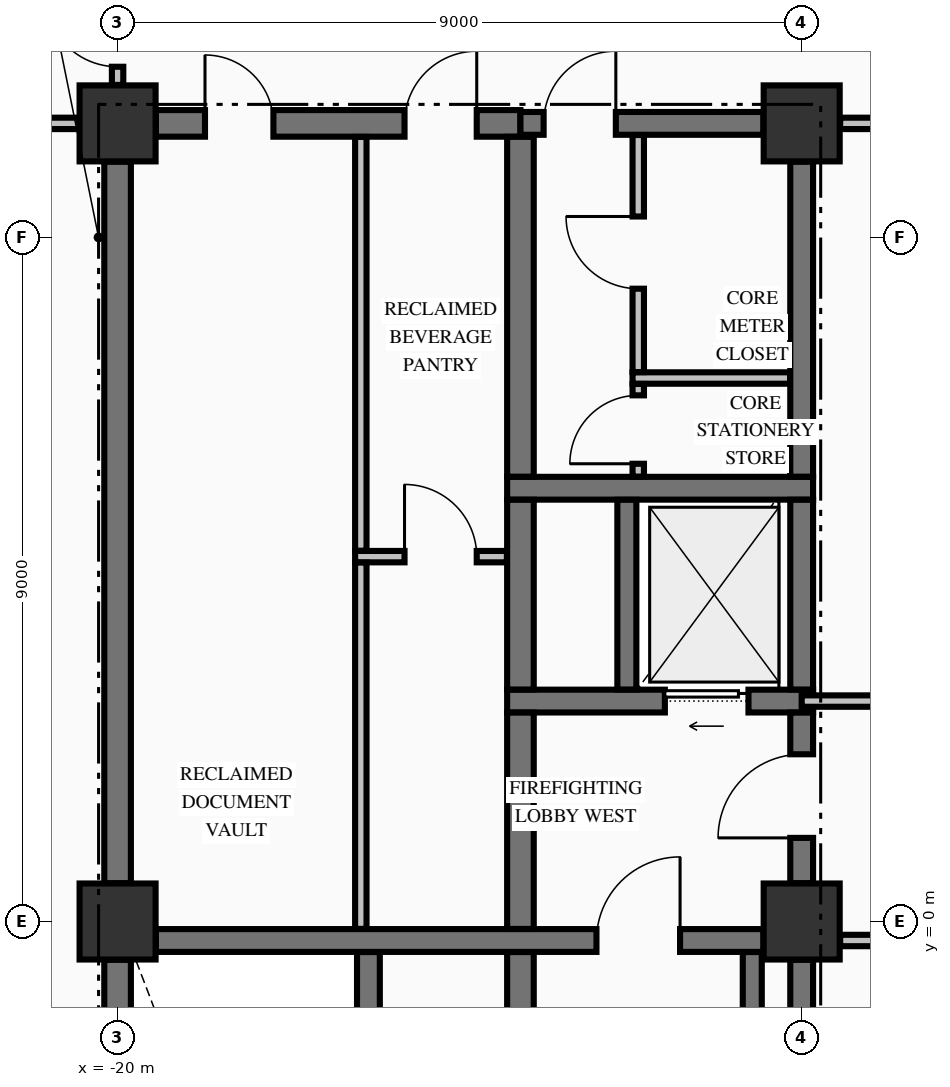
"""IFC4 building model, lengths in metres.
Left out: names, types, materials, properties, quantities, classifications, styles, units other than length and angle.
Written with IfcOpenShell. Run it as: python <this file> out.ifc"""

import sys

from ifc_helpers import new_model, si_unit, direction, frame, frame_2d, origin, origin_2d, place, context, subcontext, project, spatial, rectangle, extrude, element, fill, save


model = new_model("IFC4")
c1 = context("Model", 3, precision=1e-05, world=origin(), true_north=direction((0.0, 1.0)))
c2 = subcontext(c1, "Body", "Model", "MODEL_VIEW")
j1 = project(units=[si_unit("LENGTHUNIT", "METRE"), si_unit("PLANEANGLEUNIT", "RADIAN")], contexts=[c1])
p1 = place(None, origin())
s1 = spatial("IfcSite", under=j1, at=p1, CompositionType="ELEMENT")
p2 = place(p1, origin())
s2 = spatial("IfcBuilding", under=s1, at=p2, CompositionType="ELEMENT")
p3 = place(p2, frame((0.0, 0.0, 102.07)))
s3 = spatial("IfcBuildingStorey", under=s2, at=p3, CompositionType="ELEMENT", Elevation=102.07)
for number, where, z_axis, x_axis in (
    (1, (-20.0, 10.5, -0.25), (0.0, 0.0, 1.0), (1.0, 0.0, 0.0)),
    (2, (-11.0, 0.0, -0.25), (0.0, 0.0, 1.0), (1.0, 0.0, 0.0)),
    (3, (-11.0, 10.5, -0.25), (0.0, 0.0, 1.0), (1.0, 0.0, 0.0)),
    (4, (-20.0, 0.0, -0.25), (0.0, 0.0, 1.0), (1.0, 0.0, 0.0)),
):
    element("IfcColumn", number, at=place(p3, frame(where, z_axis=z_axis, x_axis=x_axis)), inside=s3, PredefinedType="COLUMN", context=c2, shape_type="SweptSolid", body=[
        extrude(rectangle(XDim=1.0, YDim=1.0, at=origin_2d()), origin(), (0.0, 0.0, 1.0), 3.57),
    ])
p4 = place(p3, frame((-19.496, -0.25, 0.0), z_axis=(0.0, 0.0, 1.0), x_axis=(1.0, 0.0, 0.0)))
e5 = element("IfcWall", 5, at=p4, inside=s3, PredefinedType="SHEAR", context=c2, shape_type="SweptSolid", body=[
    extrude(rectangle(XDim=7.992, YDim=0.3, at=frame_2d((3.996, 0.0))), origin(), (0.0, 0.0, 1.0), 3.32),
])
p5 = place(p4, frame((5.796, 0.0, 0.0)))
e6 = element("IfcOpeningElement", 6, at=p5, cuts=e5, PredefinedType="OPENING", context=c2, shape_type="SweptSolid", body=[
    extrude(rectangle(XDim=1.1, YDim=2.15, at=frame_2d((0.55, 1.075))), frame((0.0, 0.16, 0.0), z_axis=(0.0, -1.0, 0.0), x_axis=(1.0, 0.0, 0.0)), (0.0, 0.0, 1.0), 0.32),
])
p6 = place(p3, frame((-14.875, 2.9, 0.0), z_axis=(0.0, 0.0, 1.0), x_axis=(1.0, 0.0, 0.0)))
e7 = element("IfcWall", 7, at=p6, inside=s3, PredefinedType="SHEAR", context=c2, shape_type="SweptSolid", body=[
    extrude(rectangle(XDim=4.025, YDim=0.3, at=frame_2d((2.012, 0.0))), origin(), (0.0, 0.0, 1.0), 3.32),
])
p7 = place(p6, frame((2.075, 0.0, 0.0)))
e8 = element("IfcOpeningElement", 8, at=p7, cuts=e7, PredefinedType="OPENING", context=c2, shape_type="SweptSolid", body=[
    extrude(rectangle(XDim=1.1, YDim=2.2, at=frame_2d((0.55, 1.1))), frame((0.0, 0.16, 0.0), z_axis=(0.0, -1.0, 0.0), x_axis=(1.0, 0.0, 0.0)), (0.0, 0.0, 1.0), 0.32),
])
p8 = place(p3, frame((-14.875, 5.7, 0.0), z_axis=(0.0, 0.0, 1.0), x_axis=(1.0, 0.0, 0.0)))
e9 = element("IfcWall", 9, at=p8, inside=s3, PredefinedType="SHEAR", context=c2, shape_type="SweptSolid", body=[
    extrude(rectangle(XDim=4.025, YDim=0.3, at=frame_2d((2.012, 0.0))), origin(), (0.0, 0.0, 1.0), 3.32),
])
p9 = place(p3, frame((-19.496, 10.5, 0.0), z_axis=(0.0, 0.0, 1.0), x_axis=(1.0, 0.0, 0.0)))
e10 = element("IfcWall", 10, at=p9, inside=s3, PredefinedType="SHEAR", context=c2, shape_type="SweptSolid", body=[
    extrude(rectangle(XDim=4.796, YDim=0.35, at=frame_2d((2.398, 0.0))), origin(), (0.0, 0.0, 1.0), 3.32),
])
p10 = place(p9, frame((0.646, 0.0, 0.0)))
e11 = element("IfcOpeningElement", 11, at=p10, cuts=e10, PredefinedType="OPENING", context=c2, shape_type="SweptSolid", body=[
    extrude(rectangle(XDim=0.9, YDim=2.15, at=frame_2d((0.45, 1.075))), frame((0.0, 0.185, 0.0), z_axis=(0.0, -1.0, 0.0), x_axis=(1.0, 0.0, 0.0)), (0.0, 0.0, 1.0), 0.37),
])
p11 = place(p9, frame((3.271, 0.0, 0.0)))
e12 = element("IfcOpeningElement", 12, at=p11, cuts=e10, PredefinedType="OPENING", context=c2, shape_type="SweptSolid", body=[
    extrude(rectangle(XDim=0.95, YDim=2.15, at=frame_2d((0.475, 1.075))), frame((0.0, 0.185, 0.0), z_axis=(0.0, -1.0, 0.0), x_axis=(1.0, 0.0, 0.0)), (0.0, 0.0, 1.0), 0.37),
])
p12 = place(p3, frame((-14.7, 10.5, 0.0), z_axis=(0.0, 0.0, 1.0), x_axis=(1.0, 0.0, 0.0)))
e13 = element("IfcWall", 13, at=p12, inside=s3, PredefinedType="SHEAR", context=c2, shape_type="SweptSolid", body=[
    extrude(rectangle(XDim=3.196, YDim=0.3, at=frame_2d((1.598, 0.0))), origin(), (0.0, 0.0, 1.0), 3.32),
])
p13 = place(p12, frame((0.305, 0.0, 0.0)))
e14 = element("IfcOpeningElement", 14, at=p13, cuts=e13, PredefinedType="OPENING", context=c2, shape_type="SweptSolid", body=[
    extrude(rectangle(XDim=0.95, YDim=2.15, at=frame_2d((0.475, 1.075))), frame((0.0, 0.16, 0.0), z_axis=(0.0, -1.0, 0.0), x_axis=(1.0, 0.0, 0.0)), (0.0, 0.0, 1.0), 0.32),
])
p14 = place(p3, frame((-10.494, -0.25, 0.0), z_axis=(0.0, 0.0, 1.0), x_axis=(1.0, 0.0, 0.0)))
e15 = element("IfcWall", 15, at=p14, inside=s3, PredefinedType="PARTITIONING", context=c2, shape_type="SweptSolid", body=[
    extrude(rectangle(XDim=20.988, YDim=0.15, at=frame_2d((10.494, 0.0))), origin(), (0.0, 0.0, 1.0), 3.32),
])
p15 = place(p14, frame((12.594, 0.0, 0.0)))
e16 = element("IfcOpeningElement", 16, at=p15, cuts=e15, PredefinedType="OPENING", context=c2, shape_type="SweptSolid", body=[
    extrude(rectangle(XDim=1.1, YDim=2.15, at=frame_2d((0.55, 1.075))), frame((0.0, 0.085, 0.0), z_axis=(0.0, -1.0, 0.0), x_axis=(1.0, 0.0, 0.0)), (0.0, 0.0, 1.0), 0.17),
])
p16 = place(p14, frame((5.249, 0.0, 0.0)))
e17 = element("IfcOpeningElement", 17, at=p16, cuts=e15, PredefinedType="OPENING", context=c2, shape_type="SweptSolid", body=[
    extrude(rectangle(XDim=1.05, YDim=2.15, at=frame_2d((0.525, 1.075))), frame((0.0, 0.085, 0.0), z_axis=(0.0, -1.0, 0.0), x_axis=(1.0, 0.0, 0.0)), (0.0, 0.0, 1.0), 0.17),
])
p17 = place(p14, frame((17.399, 0.0, 0.0)))
e18 = element("IfcOpeningElement", 18, at=p17, cuts=e15, PredefinedType="OPENING", context=c2, shape_type="SweptSolid", body=[
    extrude(rectangle(XDim=0.95, YDim=2.15, at=frame_2d((0.475, 1.075))), frame((0.0, 0.085, 0.0), z_axis=(0.0, -1.0, 0.0), x_axis=(1.0, 0.0, 0.0)), (0.0, 0.0, 1.0), 0.17),
])
p18 = place(p3, frame((-11.0, 2.9, 0.0), z_axis=(0.0, 0.0, 1.0), x_axis=(1.0, 0.0, 0.0)))
e19 = element("IfcWall", 19, at=p18, inside=s3, PredefinedType="PARTITIONING", context=c2, shape_type="SweptSolid", body=[
    extrude(rectangle(XDim=22.0, YDim=0.15, at=frame_2d((11.0, 0.0))), origin(), (0.0, 0.0, 1.0), 3.32),
])
p19 = place(p18, frame((13.1, 0.0, 0.0)))
e20 = element("IfcOpeningElement", 20, at=p19, cuts=e19, PredefinedType="OPENING", context=c2, shape_type="SweptSolid", body=[
    extrude(rectangle(XDim=1.1, YDim=2.15, at=frame_2d((0.55, 1.075))), frame((0.0, 0.085, 0.0), z_axis=(0.0, -1.0, 0.0), x_axis=(1.0, 0.0, 0.0)), (0.0, 0.0, 1.0), 0.17),
])
p20 = place(p18, frame((5.755, 0.0, 0.0)))
e21 = element("IfcOpeningElement", 21, at=p20, cuts=e19, PredefinedType="OPENING", context=c2, shape_type="SweptSolid", body=[
    extrude(rectangle(XDim=1.05, YDim=2.15, at=frame_2d((0.525, 1.075))), frame((0.0, 0.085, 0.0), z_axis=(0.0, -1.0, 0.0), x_axis=(1.0, 0.0, 0.0)), (0.0, 0.0, 1.0), 0.17),
])
p21 = place(p18, frame((15.755, 0.0, 0.0)))
e22 = element("IfcOpeningElement", 22, at=p21, cuts=e19, PredefinedType="OPENING", context=c2, shape_type="SweptSolid", body=[
    extrude(rectangle(XDim=0.95, YDim=2.15, at=frame_2d((0.475, 1.075))), frame((0.0, 0.085, 0.0), z_axis=(0.0, -1.0, 0.0), x_axis=(1.0, 0.0, 0.0)), (0.0, 0.0, 1.0), 0.17),
])
p22 = place(p18, frame((19.385, 0.0, 0.0)))
e23 = element("IfcOpeningElement", 23, at=p22, cuts=e19, PredefinedType="OPENING", context=c2, shape_type="SweptSolid", body=[
    extrude(rectangle(XDim=0.95, YDim=2.15, at=frame_2d((0.475, 1.075))), frame((0.0, 0.085, 0.0), z_axis=(0.0, -1.0, 0.0), x_axis=(1.0, 0.0, 0.0)), (0.0, 0.0, 1.0), 0.17),
])
p23 = place(p3, frame((-16.875, 4.8, 0.0), z_axis=(0.0, 0.0, 1.0), x_axis=(1.0, 0.0, 0.0)))
e24 = element("IfcWall", 24, at=p23, inside=s3, PredefinedType="PARTITIONING", context=c2, shape_type="SweptSolid", body=[
    extrude(rectangle(XDim=1.997, YDim=0.15, at=frame_2d((0.999, 0.0))), origin(), (0.0, 0.0, 1.0), 3.32),
])
p24 = place(p23, frame((0.65, 0.0, 0.0)))
e25 = element("IfcOpeningElement", 25, at=p24, cuts=e24, PredefinedType="OPENING", context=c2, shape_type="SweptSolid", body=[
    extrude(rectangle(XDim=0.95, YDim=2.15, at=frame_2d((0.475, 1.075))), frame((0.0, 0.085, 0.0), z_axis=(0.0, -1.0, 0.0), x_axis=(1.0, 0.0, 0.0)), (0.0, 0.0, 1.0), 0.17),
])
p25 = place(p3, frame((-13.225, 7.15, 0.0), z_axis=(0.0, 0.0, 1.0), x_axis=(1.0, 0.0, 0.0)))
e26 = element("IfcWall", 26, at=p25, inside=s3, PredefinedType="PARTITIONING", context=c2, shape_type="SweptSolid", body=[
    extrude(rectangle(XDim=2.072, YDim=0.15, at=frame_2d((1.036, 0.0))), origin(), (0.0, 0.0, 1.0), 3.32),
])
p26 = place(p3, frame((-22.835, 10.5, 0.0), z_axis=(0.0, 0.0, 1.0), x_axis=(1.0, 0.0, 0.0)))
e27 = element("IfcWall", 27, at=p26, inside=s3, PredefinedType="PARTITIONING", context=c2, shape_type="SweptSolid", body=[
    extrude(rectangle(XDim=2.329, YDim=0.15, at=frame_2d((1.165, 0.0))), origin(), (0.0, 0.0, 1.0), 3.32),
])
p27 = place(p26, frame((0.835, 0.0, 0.0)))
e28 = element("IfcOpeningElement", 28, at=p27, cuts=e27, PredefinedType="OPENING", context=c2, shape_type="SweptSolid", body=[
    extrude(rectangle(XDim=1.0, YDim=2.15, at=frame_2d((0.5, 1.075))), frame((0.0, 0.085, 0.0), z_axis=(0.0, -1.0, 0.0), x_axis=(1.0, 0.0, 0.0)), (0.0, 0.0, 1.0), 0.17),
])
p28 = place(p3, frame((-10.494, 10.5, 0.0), z_axis=(0.0, 0.0, 1.0), x_axis=(1.0, 0.0, 0.0)))
e29 = element("IfcWall", 29, at=p28, inside=s3, PredefinedType="PARTITIONING", context=c2, shape_type="SweptSolid", body=[
    extrude(rectangle(XDim=20.988, YDim=0.15, at=frame_2d((10.494, 0.0))), origin(), (0.0, 0.0, 1.0), 3.32),
])
p29 = place(p28, frame((12.594, 0.0, 0.0)))
e30 = element("IfcOpeningElement", 30, at=p29, cuts=e29, PredefinedType="OPENING", context=c2, shape_type="SweptSolid", body=[
    extrude(rectangle(XDim=1.1, YDim=2.15, at=frame_2d((0.55, 1.075))), frame((0.0, 0.085, 0.0), z_axis=(0.0, -1.0, 0.0), x_axis=(1.0, 0.0, 0.0)), (0.0, 0.0, 1.0), 0.17),
])
p30 = place(p3, frame((-20.0, -9.446, 0.0), z_axis=(0.0, 0.0, 1.0), x_axis=(0.0, 1.0, 0.0)))
e31 = element("IfcWall", 31, at=p30, inside=s3, PredefinedType="SHEAR", context=c2, shape_type="SweptSolid", body=[
    extrude(rectangle(XDim=8.942, YDim=0.35, at=frame_2d((4.471, 0.0))), origin(), (0.0, 0.0, 1.0), 3.32),
])
p31 = place(p3, frame((-20.0, 0.504, 0.0), z_axis=(0.0, 0.0, 1.0), x_axis=(0.0, 1.0, 0.0)))
e32 = element("IfcWall", 32, at=p31, inside=s3, PredefinedType="SHEAR", context=c2, shape_type="SweptSolid", body=[
    extrude(rectangle(XDim=9.492, YDim=0.35, at=frame_2d((4.746, 0.0))), origin(), (0.0, 0.0, 1.0), 3.32),
])
p32 = place(p3, frame((-16.7, -9.773, 0.0), z_axis=(0.0, 0.0, 1.0), x_axis=(0.0, 1.0, 0.0)))
e33 = element("IfcWall", 33, at=p32, inside=s3, PredefinedType="SHEAR", context=c2, shape_type="SweptSolid", body=[
    extrude(rectangle(XDim=9.371, YDim=0.3, at=frame_2d((4.686, 0.0))), origin(), (0.0, 0.0, 1.0), 3.32),
])
p33 = place(p3, frame((-14.7, -9.773, 0.0), z_axis=(0.0, 0.0, 1.0), x_axis=(0.0, 1.0, 0.0)))
e34 = element("IfcWall", 34, at=p33, inside=s3, PredefinedType="SHEAR", context=c2, shape_type="SweptSolid", body=[
    extrude(rectangle(XDim=9.371, YDim=0.35, at=frame_2d((4.686, 0.0))), origin(), (0.0, 0.0, 1.0), 3.32),
])
p34 = place(p3, frame((-14.7, -0.098, 0.0), z_axis=(0.0, 0.0, 1.0), x_axis=(0.0, 1.0, 0.0)))
e35 = element("IfcWall", 35, at=p34, inside=s3, PredefinedType="SHEAR", context=c2, shape_type="SweptSolid", body=[
    extrude(rectangle(XDim=2.846, YDim=0.35, at=frame_2d((1.423, 0.0))), origin(), (0.0, 0.0, 1.0), 3.32),
])
p35 = place(p3, frame((-14.7, 3.052, 0.0), z_axis=(0.0, 0.0, 1.0), x_axis=(0.0, 1.0, 0.0)))
e36 = element("IfcWall", 36, at=p35, inside=s3, PredefinedType="SHEAR", context=c2, shape_type="SweptSolid", body=[
    extrude(rectangle(XDim=2.496, YDim=0.35, at=frame_2d((1.248, 0.0))), origin(), (0.0, 0.0, 1.0), 3.32),
])
p36 = place(p3, frame((-14.7, 5.852, 0.0), z_axis=(0.0, 0.0, 1.0), x_axis=(0.0, 1.0, 0.0)))
e37 = element("IfcWall", 37, at=p36, inside=s3, PredefinedType="SHEAR", context=c2, shape_type="SweptSolid", body=[
    extrude(rectangle(XDim=4.471, YDim=0.35, at=frame_2d((2.235, 0.0))), origin(), (0.0, 0.0, 1.0), 3.32),
])
p37 = place(p3, frame((-13.3, 3.052, 0.0), z_axis=(0.0, 0.0, 1.0), x_axis=(0.0, 1.0, 0.0)))
e38 = element("IfcWall", 38, at=p37, inside=s3, PredefinedType="SOLIDWALL", context=c2, shape_type="SweptSolid", body=[
    extrude(rectangle(XDim=2.496, YDim=0.25, at=frame_2d((1.248, 0.0))), origin(), (0.0, 0.0, 1.0), 3.32),
])
p38 = place(p3, frame((-11.65, -9.798, 0.0), z_axis=(0.0, 0.0, 1.0), x_axis=(0.0, 1.0, 0.0)))
e39 = element("IfcWall", 39, at=p38, inside=s3, PredefinedType="SOLIDWALL", context=c2, shape_type="SweptSolid", body=[
    extrude(rectangle(XDim=9.396, YDim=0.25, at=frame_2d((4.698, 0.0))), origin(), (0.0, 0.0, 1.0), 3.32),
])
p39 = place(p3, frame((-11.0, -9.446, 0.0), z_axis=(0.0, 0.0, 1.0), x_axis=(0.0, 1.0, 0.0)))
e40 = element("IfcWall", 40, at=p39, inside=s3, PredefinedType="SHEAR", context=c2, shape_type="SweptSolid", body=[
    extrude(rectangle(XDim=8.942, YDim=0.3, at=frame_2d((4.471, 0.0))), origin(), (0.0, 0.0, 1.0), 3.32),
])
p40 = place(p3, frame((-11.0, 0.504, 0.0), z_axis=(0.0, 0.0, 1.0), x_axis=(0.0, 1.0, 0.0)))
e41 = element("IfcWall", 41, at=p40, inside=s3, PredefinedType="SHEAR", context=c2, shape_type="SweptSolid", body=[
    extrude(rectangle(XDim=2.244, YDim=0.3, at=frame_2d((1.122, 0.0))), origin(), (0.0, 0.0, 1.0), 3.32),
])
p41 = place(p40, frame((0.596, 0.0, 0.0)))
e42 = element("IfcOpeningElement", 42, at=p41, cuts=e41, PredefinedType="OPENING", context=c2, shape_type="SweptSolid", body=[
    extrude(rectangle(XDim=1.1, YDim=2.15, at=frame_2d((0.55, 1.075))), frame((0.0, 0.16, 0.0), z_axis=(0.0, -1.0, 0.0), x_axis=(1.0, 0.0, 0.0)), (0.0, 0.0, 1.0), 0.32),
])
p42 = place(p3, frame((-11.0, 3.052, 0.0), z_axis=(0.0, 0.0, 1.0), x_axis=(0.0, 1.0, 0.0)))
e43 = element("IfcWall", 43, at=p42, inside=s3, PredefinedType="SHEAR", context=c2, shape_type="SweptSolid", body=[
    extrude(rectangle(XDim=2.496, YDim=0.3, at=frame_2d((1.248, 0.0))), origin(), (0.0, 0.0, 1.0), 3.32),
])
p43 = place(p3, frame((-11.0, 5.852, 0.0), z_axis=(0.0, 0.0, 1.0), x_axis=(0.0, 1.0, 0.0)))
e44 = element("IfcWall", 44, at=p43, inside=s3, PredefinedType="SHEAR", context=c2, shape_type="SweptSolid", body=[
    extrude(rectangle(XDim=4.144, YDim=0.3, at=frame_2d((2.072, 0.0))), origin(), (0.0, 0.0, 1.0), 3.32),
])
p44 = place(p3, frame((-20.0, 11.006, 0.0), z_axis=(0.0, 0.0, 1.0), x_axis=(0.0, 1.0, 0.0)))
e45 = element("IfcWall", 45, at=p44, inside=s3, PredefinedType="PARTITIONING", context=c2, shape_type="SweptSolid", body=[
    extrude(rectangle(XDim=1.866, YDim=0.15, at=frame_2d((0.933, 0.0))), origin(), (0.0, 0.0, 1.0), 2.81),
])
p45 = place(p44, frame((0.239, 0.0, 0.0)))
e46 = element("IfcOpeningElement", 46, at=p45, cuts=e45, PredefinedType="OPENING", context=c2, shape_type="SweptSolid", body=[
    extrude(rectangle(XDim=0.95, YDim=2.15, at=frame_2d((0.475, 1.075))), frame((0.0, 0.085, 0.0), z_axis=(0.0, -1.0, 0.0), x_axis=(1.0, 0.0, 0.0)), (0.0, 0.0, 1.0), 0.17),
])
p46 = place(p3, frame((-16.8, -0.097, 0.0), z_axis=(0.0, 0.0, 1.0), x_axis=(0.0, 1.0, 0.0)))
e47 = element("IfcWall", 47, at=p46, inside=s3, PredefinedType="PARTITIONING", context=c2, shape_type="SweptSolid", body=[
    extrude(rectangle(XDim=4.819, YDim=0.15, at=frame_2d((2.409, 0.0))), origin(), (0.0, 0.0, 1.0), 3.32),
])
p47 = place(p3, frame((-16.8, 4.878, 0.0), z_axis=(0.0, 0.0, 1.0), x_axis=(0.0, 1.0, 0.0)))
e48 = element("IfcWall", 48, at=p47, inside=s3, PredefinedType="PARTITIONING", context=c2, shape_type="SweptSolid", body=[
    extrude(rectangle(XDim=5.444, YDim=0.15, at=frame_2d((2.722, 0.0))), origin(), (0.0, 0.0, 1.0), 3.32),
])
p48 = place(p3, frame((-13.15, 5.853, 0.0), z_axis=(0.0, 0.0, 1.0), x_axis=(0.0, 1.0, 0.0)))
e49 = element("IfcWall", 49, at=p48, inside=s3, PredefinedType="PARTITIONING", context=c2, shape_type="SweptSolid", body=[
    extrude(rectangle(XDim=1.219, YDim=0.15, at=frame_2d((0.609, 0.0))), origin(), (0.0, 0.0, 1.0), 3.32),
])
p49 = place(p48, frame((0.169, 0.0, 0.0)))
e50 = element("IfcOpeningElement", 50, at=p49, cuts=e49, PredefinedType="OPENING", context=c2, shape_type="SweptSolid", body=[
    extrude(rectangle(XDim=0.9, YDim=2.15, at=frame_2d((0.45, 1.075))), frame((0.0, 0.085, 0.0), z_axis=(0.0, -1.0, 0.0), x_axis=(1.0, 0.0, 0.0)), (0.0, 0.0, 1.0), 0.17),
])
p50 = place(p3, frame((-13.15, 7.228, 0.0), z_axis=(0.0, 0.0, 1.0), x_axis=(0.0, 1.0, 0.0)))
e51 = element("IfcWall", 51, at=p50, inside=s3, PredefinedType="PARTITIONING", context=c2, shape_type="SweptSolid", body=[
    extrude(rectangle(XDim=3.119, YDim=0.15, at=frame_2d((1.56, 0.0))), origin(), (0.0, 0.0, 1.0), 3.32),
])
p51 = place(p50, frame((1.097, 0.0, 0.0)))
e52 = element("IfcOpeningElement", 52, at=p51, cuts=e51, PredefinedType="OPENING", context=c2, shape_type="SweptSolid", body=[
    extrude(rectangle(XDim=0.95, YDim=2.15, at=frame_2d((0.475, 1.075))), frame((0.0, 0.085, 0.0), z_axis=(0.0, -1.0, 0.0), x_axis=(1.0, 0.0, 0.0)), (0.0, 0.0, 1.0), 0.17),
])
p52 = place(p5, origin())
e53 = element("IfcDoor", 53, at=p52, inside=s3, OperationType="SINGLE_SWING_RIGHT", PredefinedType="DOOR", context=c2, shape_type="SweptSolid", body=[
    extrude(rectangle(XDim=1.1, YDim=2.15, at=frame_2d((0.55, 1.075))), frame((0.0, 0.025, 0.0), z_axis=(0.0, -1.0, 0.0), x_axis=(1.0, 0.0, 0.0)), (0.0, 0.0, 1.0), 0.05),
])
fill(e6, e53)
p53 = place(p41, origin())
e54 = element("IfcDoor", 54, at=p53, inside=s3, OperationType="SINGLE_SWING_LEFT", PredefinedType="DOOR", context=c2, shape_type="SweptSolid", body=[
    extrude(rectangle(XDim=1.1, YDim=2.15, at=frame_2d((0.55, 1.075))), frame((0.0, 0.025, 0.0), z_axis=(0.0, -1.0, 0.0), x_axis=(1.0, 0.0, 0.0)), (0.0, 0.0, 1.0), 0.05),
])
fill(e42, e54)
p54 = place(p7, origin())
e55 = element("IfcDoor", 55, at=p54, inside=s3, OperationType="SLIDING_TO_LEFT", PredefinedType="DOOR", context=c2, shape_type="SweptSolid", body=[
    extrude(rectangle(XDim=1.1, YDim=2.2, at=frame_2d((0.55, 1.1))), frame((0.0, 0.025, 0.0), z_axis=(0.0, -1.0, 0.0), x_axis=(1.0, 0.0, 0.0)), (0.0, 0.0, 1.0), 0.05),
])
fill(e8, e55)
p55 = place(p13, origin())
e56 = element("IfcDoor", 56, at=p55, inside=s3, OperationType="SINGLE_SWING_RIGHT", PredefinedType="DOOR", context=c2, shape_type="SweptSolid", body=[
    extrude(rectangle(XDim=0.95, YDim=2.15, at=frame_2d((0.475, 1.075))), frame((0.0, 0.025, 0.0), z_axis=(0.0, -1.0, 0.0), x_axis=(1.0, 0.0, 0.0)), (0.0, 0.0, 1.0), 0.05),
])
fill(e14, e56)
p56 = place(p49, origin())
e57 = element("IfcDoor", 57, at=p56, inside=s3, OperationType="SINGLE_SWING_LEFT", PredefinedType="DOOR", context=c2, shape_type="SweptSolid", body=[
    extrude(rectangle(XDim=0.9, YDim=2.15, at=frame_2d((0.45, 1.075))), frame((0.0, 0.025, 0.0), z_axis=(0.0, -1.0, 0.0), x_axis=(1.0, 0.0, 0.0)), (0.0, 0.0, 1.0), 0.05),
])
fill(e50, e57)
p57 = place(p51, origin())
e58 = element("IfcDoor", 58, at=p57, inside=s3, OperationType="SINGLE_SWING_RIGHT", PredefinedType="DOOR", context=c2, shape_type="SweptSolid", body=[
    extrude(rectangle(XDim=0.95, YDim=2.15, at=frame_2d((0.475, 1.075))), frame((0.0, 0.025, 0.0), z_axis=(0.0, -1.0, 0.0), x_axis=(1.0, 0.0, 0.0)), (0.0, 0.0, 1.0), 0.05),
])
fill(e52, e58)
p58 = place(p10, origin())
e59 = element("IfcDoor", 59, at=p58, inside=s3, OperationType="SINGLE_SWING_LEFT", PredefinedType="DOOR", context=c2, shape_type="SweptSolid", body=[
    extrude(rectangle(XDim=0.9, YDim=2.15, at=frame_2d((0.45, 1.075))), frame((0.0, 0.025, 0.0), z_axis=(0.0, -1.0, 0.0), x_axis=(1.0, 0.0, 0.0)), (0.0, 0.0, 1.0), 0.05),
])
fill(e11, e59)
p59 = place(p11, origin())
e60 = element("IfcDoor", 60, at=p59, inside=s3, OperationType="SINGLE_SWING_RIGHT", PredefinedType="DOOR", context=c2, shape_type="SweptSolid", body=[
    extrude(rectangle(XDim=0.95, YDim=2.15, at=frame_2d((0.475, 1.075))), frame((0.0, 0.025, 0.0), z_axis=(0.0, -1.0, 0.0), x_axis=(1.0, 0.0, 0.0)), (0.0, 0.0, 1.0), 0.05),
])
fill(e12, e60)
p60 = place(p24, origin())
e61 = element("IfcDoor", 61, at=p60, inside=s3, OperationType="SINGLE_SWING_LEFT", PredefinedType="DOOR", context=c2, shape_type="SweptSolid", body=[
    extrude(rectangle(XDim=0.95, YDim=2.15, at=frame_2d((0.475, 1.075))), frame((0.0, 0.025, 0.0), z_axis=(0.0, -1.0, 0.0), x_axis=(1.0, 0.0, 0.0)), (0.0, 0.0, 1.0), 0.05),
])
fill(e25, e61)
p61 = place(p45, origin())
e62 = element("IfcDoor", 62, at=p61, inside=s3, OperationType="SINGLE_SWING_RIGHT", PredefinedType="DOOR", context=c2, shape_type="SweptSolid", body=[
    extrude(rectangle(XDim=0.95, YDim=2.15, at=frame_2d((0.475, 1.075))), frame((0.0, 0.025, 0.0), z_axis=(0.0, -1.0, 0.0), x_axis=(1.0, 0.0, 0.0)), (0.0, 0.0, 1.0), 0.05),
])
fill(e46, e62)
save(model, sys.argv[1])
